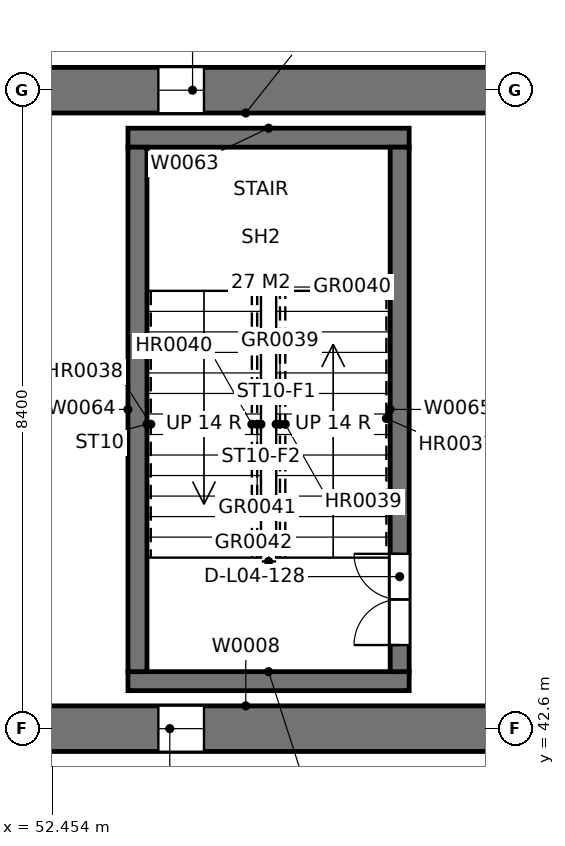
"""IFC4 building model, lengths in metres.
Left out: names, types, materials, properties, quantities, classifications, styles, units other than length and angle.
Written with IfcOpenShell. Run it as: python <this file> out.ifc"""

import sys

from ifc_helpers import new_model, si_unit, direction, frame, frame_2d, origin, place, context, subcontext, project, spatial, rectangle, extrude, element, fill, save


model = new_model("IFC4")
c1 = context("Model", 3, precision=1e-05, world=origin(), true_north=direction((0.0, 1.0)))
c2 = subcontext(c1, "Body", "Model", "MODEL_VIEW")
j1 = project(units=[si_unit("LENGTHUNIT", "METRE"), si_unit("PLANEANGLEUNIT", "RADIAN")], contexts=[c1])
p1 = place(None, origin())
s1 = spatial("IfcSite", under=j1, at=p1, CompositionType="ELEMENT")
p2 = place(p1, origin())
s2 = spatial("IfcBuilding", under=s1, at=p2, CompositionType="ELEMENT")
p3 = place(p2, frame((0.0, 0.0, 19.2)))
s3 = spatial("IfcBuildingStorey", under=s2, at=p3, CompositionType="ELEMENT", Elevation=19.2)
p4 = place(p3, frame((51.3, 42.6, 0.0), z_axis=(0.0, 0.0, 1.0), x_axis=(1.0, 0.0, 0.0)))
e1 = element("IfcWall", 1, at=p4, inside=s3, PredefinedType="SOLIDWALL", context=c2, shape_type="SweptSolid", body=[
    extrude(rectangle(XDim=7.4, YDim=0.6, at=frame_2d((3.7, 0.0))), origin(), (0.0, 0.0, 1.0), 4.8),
])
p5 = place(p4, frame((2.55, 0.0, 1.5)))
e2 = element("IfcOpeningElement", 2, at=p5, cuts=e1, PredefinedType="OPENING", context=c2, shape_type="SweptSolid", body=[
    extrude(rectangle(XDim=0.6, YDim=1.8, at=frame_2d((0.3, 0.9))), frame((0.0, 0.31, 0.0), z_axis=(0.0, -1.0, 0.0), x_axis=(1.0, 0.0, 0.0)), (0.0, 0.0, 1.0), 0.62),
])
p6 = place(p3, frame((58.7, 51.0, 0.0), z_axis=(0.0, 0.0, 1.0), x_axis=(-1.0, 0.0, 0.0)))
e3 = element("IfcWall", 3, at=p6, inside=s3, PredefinedType="SOLIDWALL", context=c2, shape_type="SweptSolid", body=[
    extrude(rectangle(XDim=7.4, YDim=0.6, at=frame_2d((3.7, 0.0))), origin(), (0.0, 0.0, 1.0), 4.8),
])
p7 = place(p6, frame((4.25, 0.0, 1.5)))
e4 = element("IfcOpeningElement", 4, at=p7, cuts=e3, PredefinedType="OPENING", context=c2, shape_type="SweptSolid", body=[
    extrude(rectangle(XDim=0.6, YDim=1.8, at=frame_2d((0.3, 0.9))), frame((0.0, 0.31, 0.0), z_axis=(0.0, -1.0, 0.0), x_axis=(1.0, 0.0, 0.0)), (0.0, 0.0, 1.0), 0.62),
])
for number, where, z_axis, x_axis in (
    (5, (53.45, 43.225, 0.0), (0.0, 0.0, 1.0), (1.0, 0.0, 0.0)),
    (6, (53.45, 50.375, 0.0), (0.0, 0.0, 1.0), (1.0, 0.0, 0.0)),
):
    element("IfcWall", number, at=place(p3, frame(where, z_axis=z_axis, x_axis=x_axis)), inside=s3, PredefinedType="SOLIDWALL", context=c2, shape_type="SweptSolid", body=[
        extrude(rectangle(XDim=3.7, YDim=0.25, at=frame_2d((1.85, 0.0))), origin(), (0.0, 0.0, 1.0), 4.8),
    ])
p8 = place(p3, frame((53.575, 43.35, 0.0), z_axis=(0.0, 0.0, 1.0), x_axis=(0.0, 1.0, 0.0)))
e7 = element("IfcWall", 7, at=p8, inside=s3, PredefinedType="SOLIDWALL", context=c2, shape_type="SweptSolid", body=[
    extrude(rectangle(XDim=6.9, YDim=0.25, at=frame_2d((3.45, 0.0))), origin(), (0.0, 0.0, 1.0), 4.8),
])
p9 = place(p3, frame((57.025, 43.35, 0.0), z_axis=(0.0, 0.0, 1.0), x_axis=(0.0, 1.0, 0.0)))
e8 = element("IfcWall", 8, at=p9, inside=s3, PredefinedType="SOLIDWALL", context=c2, shape_type="SweptSolid", body=[
    extrude(rectangle(XDim=6.9, YDim=0.25, at=frame_2d((3.45, 0.0))), origin(), (0.0, 0.0, 1.0), 4.8),
])
p10 = place(p9, frame((0.35, 0.0, 0.0)))
e9 = element("IfcOpeningElement", 9, at=p10, cuts=e8, PredefinedType="OPENING", context=c2, shape_type="SweptSolid", body=[
    extrude(rectangle(XDim=1.2, YDim=2.1, at=frame_2d((0.6, 1.05))), frame((0.0, 0.135, 0.0), z_axis=(0.0, -1.0, 0.0), x_axis=(1.0, 0.0, 0.0)), (0.0, 0.0, 1.0), 0.27),
])
p11 = place(p10, origin())
e10 = element("IfcDoor", 10, at=p11, inside=s3, OperationType="DOUBLE_DOOR_SINGLE_SWING", PredefinedType="DOOR", context=c2, shape_type="SweptSolid", body=[
    extrude(rectangle(XDim=1.2, YDim=2.1, at=frame_2d((0.6, 1.05))), frame((0.0, 0.025, 0.0), z_axis=(0.0, -1.0, 0.0), x_axis=(1.0, 0.0, 0.0)), (0.0, 0.0, 1.0), 0.05),
])
fill(e9, e10)
p12 = place(p5, origin())
e11 = element("IfcWindow", 11, at=p12, inside=s3, PartitioningType="SINGLE_PANEL", PredefinedType="WINDOW", context=c2, shape_type="SweptSolid", body=[
    extrude(rectangle(XDim=0.6, YDim=1.8, at=frame_2d((0.3, 0.9))), frame((0.0, 0.01, 0.0), z_axis=(0.0, -1.0, 0.0), x_axis=(1.0, 0.0, 0.0)), (0.0, 0.0, 1.0), 0.06),
])
fill(e2, e11)
p13 = place(p7, origin())
e12 = element("IfcWindow", 12, at=p13, inside=s3, PartitioningType="SINGLE_PANEL", PredefinedType="WINDOW", context=c2, shape_type="SweptSolid", body=[
    extrude(rectangle(XDim=0.6, YDim=1.8, at=frame_2d((0.3, 0.9))), frame((0.0, 0.01, 0.0), z_axis=(0.0, -1.0, 0.0), x_axis=(1.0, 0.0, 0.0)), (0.0, 0.0, 1.0), 0.06),
])
fill(e4, e12)
save(model, sys.argv[1])
